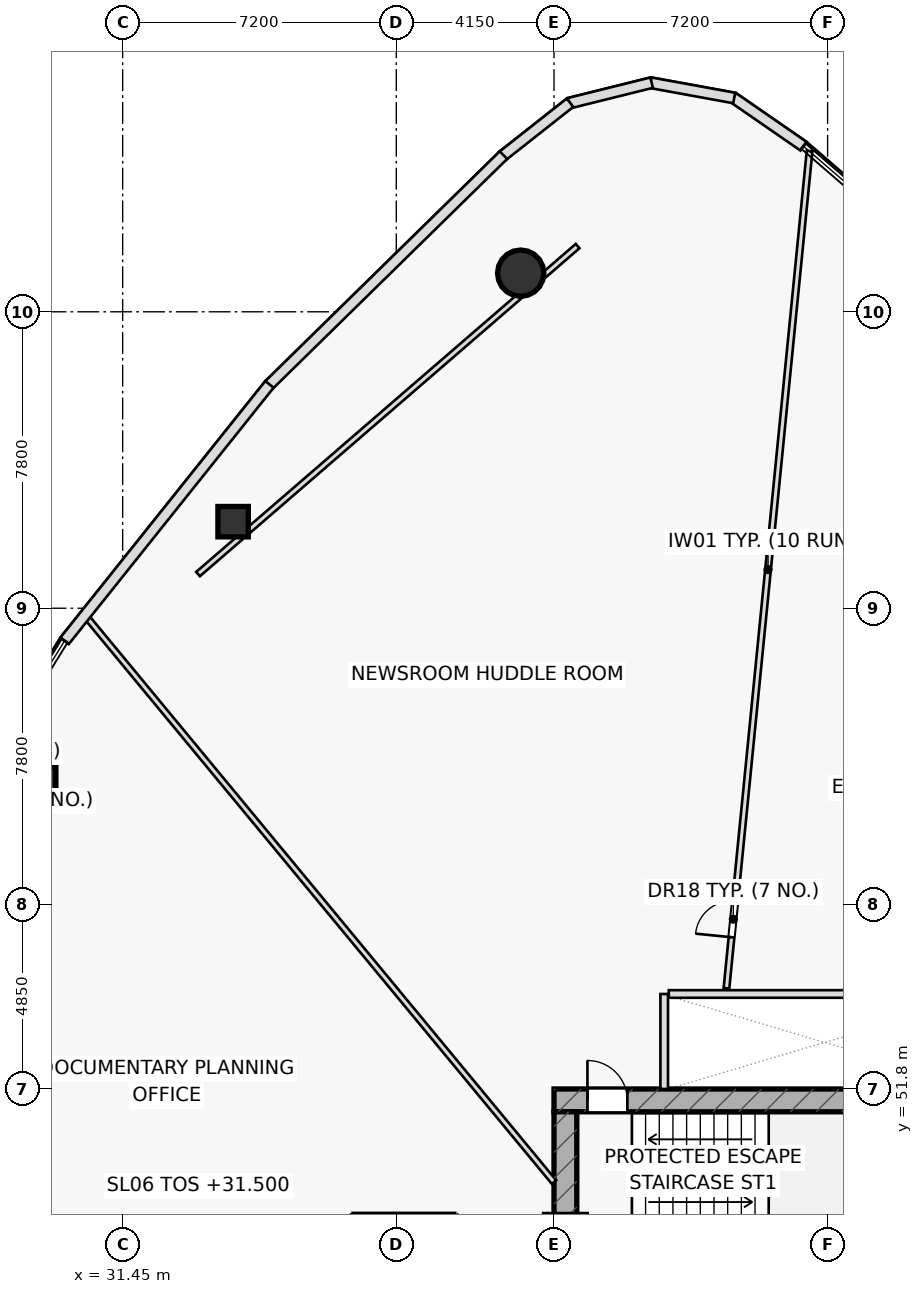
"""IFC4 building model, lengths in metres.
Left out: names, types, materials, properties, quantities, classifications, styles, units other than length and angle.
Written with IfcOpenShell. Run it as: python <this file> out.ifc"""

import sys

from ifc_helpers import new_model, si_unit, direction, frame, frame_2d, origin, origin_2d, place, context, subcontext, project, spatial, rectangle, hollow_rectangle, hollow_circle, extrude, element, fill, save


model = new_model("IFC4")
c1 = context("Model", 3, precision=1e-05, world=origin(), true_north=direction((0.0, 1.0)))
c2 = subcontext(c1, "Body", "Model", "MODEL_VIEW")
j1 = project(units=[si_unit("LENGTHUNIT", "METRE"), si_unit("PLANEANGLEUNIT", "RADIAN")], contexts=[c1])
p1 = place(None, origin())
s1 = spatial("IfcSite", under=j1, at=p1, CompositionType="ELEMENT")
p2 = place(p1, origin())
s2 = spatial("IfcBuilding", under=s1, at=p2, CompositionType="ELEMENT")
p3 = place(p2, frame((0.0, 0.0, 31.5)))
s3 = spatial("IfcBuildingStorey", under=s2, at=p3, CompositionType="ELEMENT", Elevation=31.5)
p4 = place(p3, frame((42.8, 51.5, 0.0), z_axis=(0.0, 0.0, 1.0), x_axis=(1.0, 0.0, 0.0)))
e1 = element("IfcWall", 1, at=p4, inside=s3, PredefinedType="SHEAR", context=c2, shape_type="SweptSolid", body=[
    extrude(rectangle(XDim=14.4, YDim=0.6, at=frame_2d((7.2, 0.0))), origin(), (0.0, 0.0, 1.0), 3.6),
])
p5 = place(p4, frame((0.88, 0.0, 0.0)))
e2 = element("IfcOpeningElement", 2, at=p5, cuts=e1, PredefinedType="OPENING", context=c2, shape_type="SweptSolid", body=[
    extrude(rectangle(XDim=1.05, YDim=2.2, at=frame_2d((0.525, 1.1))), frame((0.0, 0.31, 0.0), z_axis=(0.0, -1.0, 0.0), x_axis=(1.0, 0.0, 0.0)), (0.0, 0.0, 1.0), 0.62),
])
p6 = place(p3, frame((43.1, 38.8, 0.0), z_axis=(0.0, 0.0, 1.0), x_axis=(0.0, 1.0, 0.0)))
e3 = element("IfcWall", 3, at=p6, inside=s3, PredefinedType="SHEAR", context=c2, shape_type="SweptSolid", body=[
    extrude(rectangle(XDim=12.4, YDim=0.6, at=frame_2d((6.2, 0.0))), origin(), (0.0, 0.0, 1.0), 3.6),
])
p7 = place(p3, frame((41.923, 73.266, 0.0), z_axis=(0.0, 0.0, 1.0), x_axis=(1.0, 0.0, 0.0)))
e4 = element("IfcColumn", 4, at=p7, inside=s3, PredefinedType="COLUMN", context=c2, shape_type="SweptSolid", body=[
    extrude(hollow_circle(Radius=0.61, WallThickness=0.05, at=origin_2d()), origin(), (0.0, 0.0, 1.0), 3.6),
])
for number, where, z_axis, x_axis in (
    (5, (34.356, 66.728, 0.0), (0.0, 0.0, 1.0), (1.0, 0.0, 0.0)),
    (6, (29.292, 59.872, 0.0), (0.0, 0.0, 1.0), (1.0, 0.0, 0.0)),
):
    element("IfcColumn", number, at=place(p3, frame(where, z_axis=z_axis, x_axis=x_axis)), inside=s3, PredefinedType="COLUMN", context=c2, shape_type="SweptSolid", body=[
        extrude(hollow_rectangle(XDim=0.8, YDim=0.8, WallThickness=0.045, at=origin_2d()), origin(), (0.0, 0.0, 1.0), 3.6),
    ])
p8 = place(p3, frame((45.7, 51.8, 0.0), z_axis=(0.0, 0.0, 1.0), x_axis=(0.0, 1.0, 0.0)))
e7 = element("IfcWall", 7, at=p8, inside=s3, PredefinedType="PARTITIONING", context=c2, shape_type="SweptSolid", body=[
    extrude(rectangle(XDim=2.5, YDim=0.2, at=frame_2d((1.25, 0.0))), origin(), (0.0, 0.0, 1.0), 3.6),
])
p9 = place(p3, frame((43.421, 73.979, 0.0), z_axis=(0.0, 0.0, 1.0), x_axis=(-0.756659135409, -0.653809569218, 0.0)))
e8 = element("IfcWall", 8, at=p9, inside=s3, PredefinedType="PARTITIONING", context=c2, shape_type="SweptSolid", body=[
    extrude(rectangle(XDim=13.2, YDim=0.15, at=frame_2d((6.6, 0.0))), origin(), (0.0, 0.0, 1.0), 2.925),
])
p10 = place(p3, frame((47.338, 54.45, 0.0), z_axis=(0.0, 0.0, 1.0), x_axis=(0.098804932586, 0.995106821048, 0.0)))
e9 = element("IfcWall", 9, at=p10, inside=s3, PredefinedType="PARTITIONING", context=c2, shape_type="SweptSolid", body=[
    extrude(rectangle(XDim=22.14, YDim=0.15, at=frame_2d((11.07, 0.0))), origin(), (0.0, 0.0, 1.0), 2.975),
])
p11 = place(p10, frame((1.35, 0.0, 0.0)))
e10 = element("IfcOpeningElement", 10, at=p11, cuts=e9, PredefinedType="OPENING", context=c2, shape_type="SweptSolid", body=[
    extrude(rectangle(XDim=0.95, YDim=2.05, at=frame_2d((0.475, 1.025))), frame((0.0, 0.085, 0.0), z_axis=(0.0, -1.0, 0.0), x_axis=(1.0, 0.0, 0.0)), (0.0, 0.0, 1.0), 0.17),
])
p12 = place(p3, frame((42.8, 49.351, 0.0), z_axis=(0.0, 0.0, 1.0), x_axis=(-0.637467614693, 0.770477151003, 0.0)))
e11 = element("IfcWall", 11, at=p12, inside=s3, PredefinedType="PARTITIONING", context=c2, shape_type="SweptSolid", body=[
    extrude(rectangle(XDim=19.368, YDim=0.15, at=frame_2d((9.684, 0.0))), origin(), (0.0, 0.0, 1.0), 2.925),
])
p13 = place(p3, frame((37.5, 48.45, 0.0), z_axis=(0.0, 0.0, 1.0), x_axis=(1.0, 0.0, 0.0)))
e12 = element("IfcWall", 12, at=p13, inside=s3, PredefinedType="PARTITIONING", context=c2, shape_type="SweptSolid", body=[
    extrude(rectangle(XDim=2.7, YDim=0.18, at=frame_2d((1.35, 0.0))), origin(), (0.0, 0.0, 1.0), 3.6),
])
p14 = place(p3, frame((49.365, 76.607, 0.0), z_axis=(0.0, 0.0, 1.0), x_axis=(-0.822668510747, 0.568521346499, 0.0)))
e13 = element("IfcWall", 13, at=p14, inside=s3, PredefinedType="STANDARD", context=c2, shape_type="SweptSolid", body=[
    extrude(rectangle(XDim=2.25, YDim=0.28, at=frame_2d((1.125, 0.0))), origin(), (0.0, 0.0, 1.0), 3.6),
])
for number, where, z_axis, x_axis in (
    (14, (47.542, 77.875, 0.0), (0.0, 0.0, 1.0), (-0.984, 0.18, 0.0)),
    (15, (45.369, 78.278, 0.0), (0.0, 0.0, 1.0), (-0.971, -0.241, 0.0)),
):
    element("IfcWall", number, at=place(p3, frame(where, z_axis=z_axis, x_axis=x_axis)), inside=s3, PredefinedType="STANDARD", context=c2, shape_type="SweptSolid", body=[
        extrude(rectangle(XDim=2.238, YDim=0.28, at=frame_2d((1.119, 0.0))), origin(), (0.0, 0.0, 1.0), 3.6),
    ])
p15 = place(p3, frame((43.223, 77.752, 0.0), z_axis=(0.0, 0.0, 1.0), x_axis=(-0.785294404036, -0.619122523407, 0.0)))
e16 = element("IfcWall", 16, at=p15, inside=s3, PredefinedType="STANDARD", context=c2, shape_type="SweptSolid", body=[
    extrude(rectangle(XDim=2.261, YDim=0.28, at=frame_2d((1.13, 0.0))), origin(), (0.0, 0.0, 1.0), 3.6),
])
p16 = place(p3, frame((41.47, 76.372, 0.0), z_axis=(0.0, 0.0, 1.0), x_axis=(-0.714184334578, -0.699957667465, 0.0)))
e17 = element("IfcWall", 17, at=p16, inside=s3, PredefinedType="STANDARD", context=c2, shape_type="SweptSolid", body=[
    extrude(rectangle(XDim=8.649, YDim=0.28, at=frame_2d((4.324, 0.0))), origin(), (0.0, 0.0, 1.0), 3.6),
])
p17 = place(p3, frame((35.313, 70.34, 0.0), z_axis=(0.0, 0.0, 1.0), x_axis=(-0.624222665677, -0.781246480731, 0.0)))
e18 = element("IfcWall", 18, at=p17, inside=s3, PredefinedType="STANDARD", context=c2, shape_type="SweptSolid", body=[
    extrude(rectangle(XDim=8.637, YDim=0.28, at=frame_2d((4.318, 0.0))), origin(), (0.0, 0.0, 1.0), 3.6),
])
p18 = place(p3, frame((45.82, 54.3, 0.0), z_axis=(0.0, 0.0, 1.0), x_axis=(1.0, 0.0, 0.0)))
e19 = element("IfcWall", 19, at=p18, inside=s3, PredefinedType="PARTITIONING", context=c2, shape_type="SweptSolid", body=[
    extrude(rectangle(XDim=8.31, YDim=0.2, at=frame_2d((4.155, 0.0))), origin(), (0.0, 0.0, 1.0), 3.6),
])
p19 = place(p5, origin())
e20 = element("IfcDoor", 20, at=p19, inside=s3, OperationType="SINGLE_SWING_LEFT", PredefinedType="DOOR", context=c2, shape_type="SweptSolid", body=[
    extrude(rectangle(XDim=1.05, YDim=2.2, at=frame_2d((0.525, 1.1))), frame((0.0, 0.025, 0.0), z_axis=(0.0, -1.0, 0.0), x_axis=(1.0, 0.0, 0.0)), (0.0, 0.0, 1.0), 0.05),
])
fill(e2, e20)
p20 = place(p11, origin())
e21 = element("IfcDoor", 21, at=p20, inside=s3, OperationType="SINGLE_SWING_LEFT", PredefinedType="DOOR", context=c2, shape_type="SweptSolid", body=[
    extrude(rectangle(XDim=0.95, YDim=2.05, at=frame_2d((0.475, 1.025))), frame((0.0, 0.025, 0.0), z_axis=(0.0, -1.0, 0.0), x_axis=(1.0, 0.0, 0.0)), (0.0, 0.0, 1.0), 0.05),
])
fill(e10, e21)
save(model, sys.argv[1])
